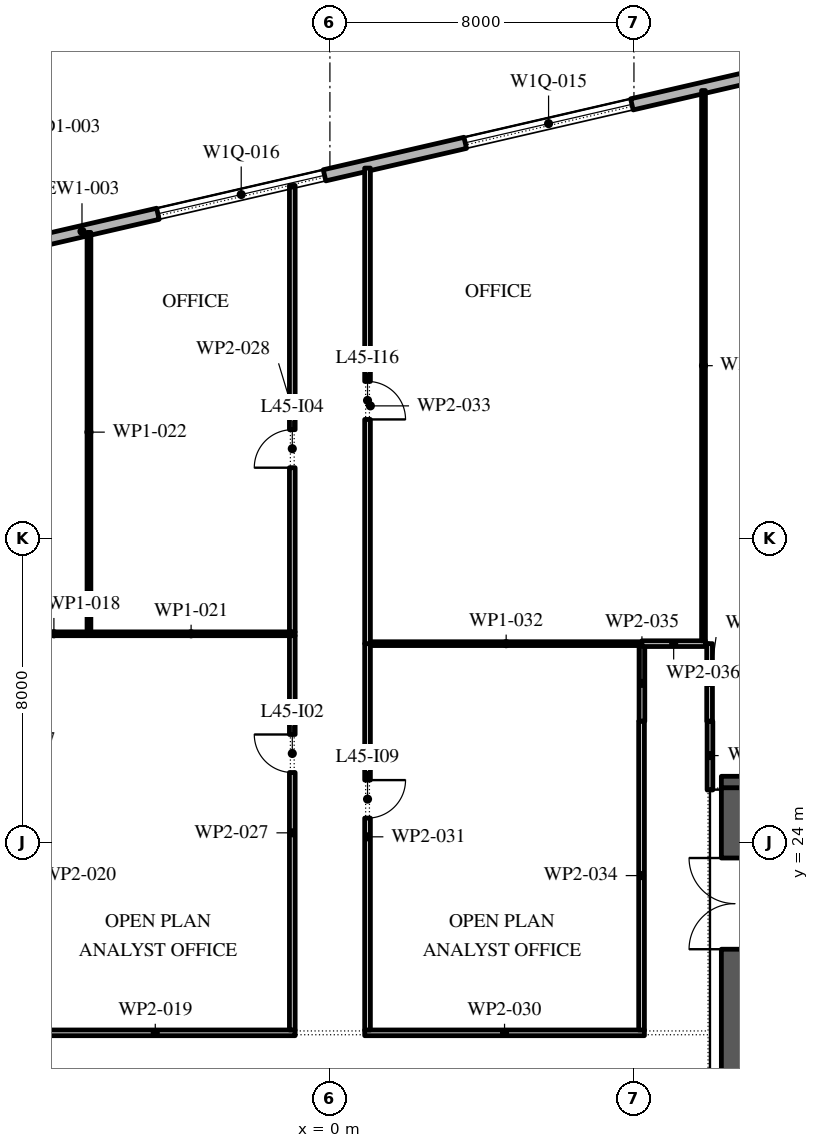
"""IFC4 building model, lengths in metres.
Left out: names, types, materials, properties, quantities, classifications, styles, units other than length and angle.
Written with IfcOpenShell. Run it as: python <this file> out.ifc"""

import sys

from ifc_helpers import new_model, si_unit, direction, frame, frame_2d, origin, place, context, subcontext, project, spatial, rectangle, extrude, element, fill, save


model = new_model("IFC4")
c1 = context("Model", 3, precision=1e-05, world=origin(), true_north=direction((0.0, 1.0)))
c2 = subcontext(c1, "Body", "Model", "MODEL_VIEW")
j1 = project(units=[si_unit("LENGTHUNIT", "METRE"), si_unit("PLANEANGLEUNIT", "RADIAN")], contexts=[c1])
p1 = place(None, origin())
s1 = spatial("IfcSite", under=j1, at=p1, CompositionType="ELEMENT")
p2 = place(p1, origin())
s2 = spatial("IfcBuilding", under=s1, at=p2, CompositionType="ELEMENT")
p3 = place(p2, frame((0.0, 0.0, 205.2)))
s3 = spatial("IfcBuildingStorey", under=s2, at=p3, CompositionType="ELEMENT", Elevation=205.2)
p4 = place(p3, frame((17.592, 45.657, 0.0), z_axis=(0.0, 0.0, 1.0), x_axis=(-0.974370243697, -0.224950279389, 0.0)))
e1 = element("IfcWall", 1, at=p4, inside=s3, PredefinedType="STANDARD", context=c2, shape_type="SweptSolid", body=[
    extrude(rectangle(XDim=49.5, YDim=0.3, at=frame_2d((24.75, 0.0))), origin(), (0.0, 0.0, 1.0), 4.0),
])
p5 = place(p4, frame((2.8, 0.0, 0.0)))
e2 = element("IfcOpeningElement", 2, at=p5, cuts=e1, PredefinedType="OPENING", context=c2, shape_type="SweptSolid", body=[
    extrude(rectangle(XDim=2.4, YDim=3.5, at=frame_2d((1.2, 1.75))), frame((0.0, 0.16, 0.0), z_axis=(0.0, -1.0, 0.0), x_axis=(1.0, 0.0, 0.0)), (0.0, 0.0, 1.0), 0.32),
])
p6 = place(p4, frame((9.9, 0.0, 0.45)))
e3 = element("IfcOpeningElement", 3, at=p6, cuts=e1, PredefinedType="OPENING", context=c2, shape_type="SweptSolid", body=[
    extrude(rectangle(XDim=4.5, YDim=2.45, at=frame_2d((2.25, 1.225))), frame((0.0, 0.16, 0.0), z_axis=(0.0, -1.0, 0.0), x_axis=(1.0, 0.0, 0.0)), (0.0, 0.0, 1.0), 0.32),
])
p7 = place(p4, frame((18.2, 0.0, 0.45)))
e4 = element("IfcOpeningElement", 4, at=p7, cuts=e1, PredefinedType="OPENING", context=c2, shape_type="SweptSolid", body=[
    extrude(rectangle(XDim=4.5, YDim=2.45, at=frame_2d((2.25, 1.225))), frame((0.0, 0.16, 0.0), z_axis=(0.0, -1.0, 0.0), x_axis=(1.0, 0.0, 0.0)), (0.0, 0.0, 1.0), 0.32),
])
p8 = place(p4, frame((26.5, 0.0, 0.45)))
e5 = element("IfcOpeningElement", 5, at=p8, cuts=e1, PredefinedType="OPENING", context=c2, shape_type="SweptSolid", body=[
    extrude(rectangle(XDim=4.5, YDim=2.45, at=frame_2d((2.25, 1.225))), frame((0.0, 0.16, 0.0), z_axis=(0.0, -1.0, 0.0), x_axis=(1.0, 0.0, 0.0)), (0.0, 0.0, 1.0), 0.32),
])
p9 = place(p4, frame((35.85, 0.0, 0.0)))
e6 = element("IfcOpeningElement", 6, at=p9, cuts=e1, PredefinedType="OPENING", context=c2, shape_type="SweptSolid", body=[
    extrude(rectangle(XDim=2.4, YDim=3.5, at=frame_2d((1.2, 1.75))), frame((0.0, 0.16, 0.0), z_axis=(0.0, -1.0, 0.0), x_axis=(1.0, 0.0, 0.0)), (0.0, 0.0, 1.0), 0.32),
])
p10 = place(p4, frame((43.1, 0.0, 0.45)))
e7 = element("IfcOpeningElement", 7, at=p10, cuts=e1, PredefinedType="OPENING", context=c2, shape_type="SweptSolid", body=[
    extrude(rectangle(XDim=4.5, YDim=2.575, at=frame_2d((2.25, 1.288))), frame((0.0, 0.16, 0.0), z_axis=(0.0, -1.0, 0.0), x_axis=(1.0, 0.0, 0.0)), (0.0, 0.0, 1.0), 0.32),
])
p11 = place(p3, frame((10.65, -2.45, 0.0), z_axis=(0.0, 0.0, 1.0), x_axis=(0.0, 1.0, 0.0)))
e8 = element("IfcWall", 8, at=p11, inside=s3, PredefinedType="SHEAR", context=c2, shape_type="SweptSolid", body=[
    extrude(rectangle(XDim=27.9, YDim=0.7, at=frame_2d((13.95, 0.0))), origin(), (0.0, 0.0, 1.0), 4.0),
])
p12 = place(p11, frame((23.65, 0.0, 0.0)))
e9 = element("IfcOpeningElement", 9, at=p12, cuts=e8, PredefinedType="OPENING", context=c2, shape_type="SweptSolid", body=[
    extrude(rectangle(XDim=2.4, YDim=2.1, at=frame_2d((1.2, 1.05))), frame((0.0, 0.36, 0.0), z_axis=(0.0, -1.0, 0.0), x_axis=(1.0, 0.0, 0.0)), (0.0, 0.0, 1.0), 0.72),
])
p13 = place(p11, frame((1.087, 0.0, 0.0)))
e10 = element("IfcOpeningElement", 10, at=p13, cuts=e8, PredefinedType="OPENING", context=c2, shape_type="SweptSolid", body=[
    extrude(rectangle(XDim=0.9, YDim=2.1, at=frame_2d((0.45, 1.05))), frame((0.0, 0.36, 0.0), z_axis=(0.0, -1.0, 0.0), x_axis=(1.0, 0.0, 0.0)), (0.0, 0.0, 1.0), 0.72),
])
p14 = place(p11, frame((4.262, 0.0, 0.0)))
e11 = element("IfcOpeningElement", 11, at=p14, cuts=e8, PredefinedType="OPENING", context=c2, shape_type="SweptSolid", body=[
    extrude(rectangle(XDim=1.0, YDim=2.1, at=frame_2d((0.5, 1.05))), frame((0.0, 0.36, 0.0), z_axis=(0.0, -1.0, 0.0), x_axis=(1.0, 0.0, 0.0)), (0.0, 0.0, 1.0), 0.72),
])
p15 = place(p3, frame((10.3, 25.6, 0.0), z_axis=(0.0, 0.0, 1.0), x_axis=(1.0, 0.0, 0.0)))
e12 = element("IfcWall", 12, at=p15, inside=s3, PredefinedType="SHEAR", context=c2, shape_type="SweptSolid", body=[
    extrude(rectangle(XDim=11.4, YDim=0.3, at=frame_2d((5.7, 0.0))), origin(), (0.0, 0.0, 1.0), 4.0),
])
p16 = place(p3, frame((-8.135, 29.5, 0.0), z_axis=(0.0, 0.0, 1.0), x_axis=(1.0, 0.0, 0.0)))
e13 = element("IfcWall", 13, at=p16, inside=s3, PredefinedType="PARTITIONING", context=c2, shape_type="SweptSolid", body=[
    extrude(rectangle(XDim=1.745, YDim=0.1, at=frame_2d((0.873, 0.0))), origin(), (0.0, 0.0, 1.0), 4.0),
])
p17 = place(p3, frame((-8.275, 19.0, 0.0), z_axis=(0.0, 0.0, 1.0), x_axis=(1.0, 0.0, 0.0)))
e14 = element("IfcWall", 14, at=p17, inside=s3, PredefinedType="PARTITIONING", context=c2, shape_type="SweptSolid", body=[
    extrude(rectangle(XDim=7.36, YDim=0.15, at=frame_2d((3.68, 0.0))), origin(), (0.0, 0.0, 1.0), 4.0),
])
p18 = place(p3, frame((-6.39, 29.5, 0.0), z_axis=(0.0, 0.0, 1.0), x_axis=(1.0, 0.0, 0.0)))
e15 = element("IfcWall", 15, at=p18, inside=s3, PredefinedType="PARTITIONING", context=c2, shape_type="SweptSolid", body=[
    extrude(rectangle(XDim=5.475, YDim=0.1, at=frame_2d((2.737, 0.0))), origin(), (0.0, 0.0, 1.0), 4.0),
])
p19 = place(p3, frame((-6.34, 40.061, 0.0), z_axis=(0.0, 0.0, 1.0), x_axis=(0.0, -1.0, 0.0)))
e16 = element("IfcWall", 16, at=p19, inside=s3, PredefinedType="PARTITIONING", context=c2, shape_type="SweptSolid", body=[
    extrude(rectangle(XDim=10.511, YDim=0.1, at=frame_2d((5.255, 0.0))), origin(), (0.0, 0.0, 1.0), 4.0),
])
p20 = place(p3, frame((-0.99, 19.075, 0.0), z_axis=(0.0, 0.0, 1.0), x_axis=(0.0, 1.0, 0.0)))
e17 = element("IfcWall", 17, at=p20, inside=s3, PredefinedType="PARTITIONING", context=c2, shape_type="SweptSolid", body=[
    extrude(rectangle(XDim=10.375, YDim=0.15, at=frame_2d((5.188, 0.0))), origin(), (0.0, 0.0, 1.0), 4.0),
])
p21 = place(p20, frame((6.775, 0.0, 0.0)))
e18 = element("IfcOpeningElement", 18, at=p21, cuts=e17, PredefinedType="OPENING", context=c2, shape_type="SweptSolid", body=[
    extrude(rectangle(XDim=1.0, YDim=2.1, at=frame_2d((0.5, 1.05))), frame((0.0, 0.085, 0.0), z_axis=(0.0, -1.0, 0.0), x_axis=(1.0, 0.0, 0.0)), (0.0, 0.0, 1.0), 0.17),
])
p22 = place(p3, frame((-0.99, 29.55, 0.0), z_axis=(0.0, 0.0, 1.0), x_axis=(0.0, 1.0, 0.0)))
e19 = element("IfcWall", 19, at=p22, inside=s3, PredefinedType="PARTITIONING", context=c2, shape_type="SweptSolid", body=[
    extrude(rectangle(XDim=11.746, YDim=0.15, at=frame_2d((5.873, 0.0))), origin(), (0.0, 0.0, 1.0), 4.0),
])
p23 = place(p22, frame((4.32, 0.0, 0.0)))
e20 = element("IfcOpeningElement", 20, at=p23, cuts=e19, PredefinedType="OPENING", context=c2, shape_type="SweptSolid", body=[
    extrude(rectangle(XDim=1.0, YDim=2.1, at=frame_2d((0.5, 1.05))), frame((0.0, 0.085, 0.0), z_axis=(0.0, -1.0, 0.0), x_axis=(1.0, 0.0, 0.0)), (0.0, 0.0, 1.0), 0.17),
])
p24 = place(p3, frame((0.915, 19.0, 0.0), z_axis=(0.0, 0.0, 1.0), x_axis=(1.0, 0.0, 0.0)))
e21 = element("IfcWall", 21, at=p24, inside=s3, PredefinedType="PARTITIONING", context=c2, shape_type="SweptSolid", body=[
    extrude(rectangle(XDim=7.36, YDim=0.15, at=frame_2d((3.68, 0.0))), origin(), (0.0, 0.0, 1.0), 4.0),
])
p25 = place(p3, frame((0.99, 29.24, 0.0), z_axis=(0.0, 0.0, 1.0), x_axis=(0.0, -1.0, 0.0)))
e22 = element("IfcWall", 22, at=p25, inside=s3, PredefinedType="PARTITIONING", context=c2, shape_type="SweptSolid", body=[
    extrude(rectangle(XDim=10.165, YDim=0.15, at=frame_2d((5.083, 0.0))), origin(), (0.0, 0.0, 1.0), 4.0),
])
p26 = place(p25, frame((3.59, 0.0, 0.0)))
e23 = element("IfcOpeningElement", 23, at=p26, cuts=e22, PredefinedType="OPENING", context=c2, shape_type="SweptSolid", body=[
    extrude(rectangle(XDim=1.0, YDim=2.1, at=frame_2d((0.5, 1.05))), frame((0.0, 0.085, 0.0), z_axis=(0.0, -1.0, 0.0), x_axis=(1.0, 0.0, 0.0)), (0.0, 0.0, 1.0), 0.17),
])
p27 = place(p3, frame((1.065, 29.24, 0.0), z_axis=(0.0, 0.0, 1.0), x_axis=(1.0, 0.0, 0.0)))
e24 = element("IfcWall", 24, at=p27, inside=s3, PredefinedType="PARTITIONING", context=c2, shape_type="SweptSolid", body=[
    extrude(rectangle(XDim=7.145, YDim=0.1, at=frame_2d((3.573, 0.0))), origin(), (0.0, 0.0, 1.0), 4.0),
])
p28 = place(p3, frame((0.99, 41.753, 0.0), z_axis=(0.0, 0.0, 1.0), x_axis=(0.0, -1.0, 0.0)))
e25 = element("IfcWall", 25, at=p28, inside=s3, PredefinedType="PARTITIONING", context=c2, shape_type="SweptSolid", body=[
    extrude(rectangle(XDim=12.513, YDim=0.15, at=frame_2d((6.256, 0.0))), origin(), (0.0, 0.0, 1.0), 4.0),
])
p29 = place(p28, frame((5.613, 0.0, 0.0)))
e26 = element("IfcOpeningElement", 26, at=p29, cuts=e25, PredefinedType="OPENING", context=c2, shape_type="SweptSolid", body=[
    extrude(rectangle(XDim=1.0, YDim=2.1, at=frame_2d((0.5, 1.05))), frame((0.0, 0.085, 0.0), z_axis=(0.0, -1.0, 0.0), x_axis=(1.0, 0.0, 0.0)), (0.0, 0.0, 1.0), 0.17),
])
p30 = place(p3, frame((8.2, 19.075, 0.0), z_axis=(0.0, 0.0, 1.0), x_axis=(0.0, 1.0, 0.0)))
e27 = element("IfcWall", 27, at=p30, inside=s3, PredefinedType="PARTITIONING", context=c2, shape_type="SweptSolid", body=[
    extrude(rectangle(XDim=8.125, YDim=0.15, at=frame_2d((4.062, 0.0))), origin(), (0.0, 0.0, 1.0), 4.0),
])
p31 = place(p3, frame((8.21, 27.2, 0.0), z_axis=(0.0, 0.0, 1.0), x_axis=(0.0, 1.0, 0.0)))
e28 = element("IfcWall", 28, at=p31, inside=s3, PredefinedType="PARTITIONING", context=c2, shape_type="SweptSolid", body=[
    extrude(rectangle(XDim=1.99, YDim=0.15, at=frame_2d((0.995, 0.0))), origin(), (0.0, 0.0, 1.0), 4.0),
])
p32 = place(p3, frame((8.21, 29.24, 0.0), z_axis=(0.0, 0.0, 1.0), x_axis=(1.0, 0.0, 0.0)))
e29 = element("IfcWall", 29, at=p32, inside=s3, PredefinedType="PARTITIONING", context=c2, shape_type="SweptSolid", body=[
    extrude(rectangle(XDim=1.67, YDim=0.15, at=frame_2d((0.835, 0.0))), origin(), (0.0, 0.0, 1.0), 4.0),
])
p33 = place(p3, frame((9.83, 43.794, 0.0), z_axis=(0.0, 0.0, 1.0), x_axis=(0.0, -1.0, 0.0)))
e30 = element("IfcWall", 30, at=p33, inside=s3, PredefinedType="PARTITIONING", context=c2, shape_type="SweptSolid", body=[
    extrude(rectangle(XDim=14.479, YDim=0.1, at=frame_2d((7.24, 0.0))), origin(), (0.0, 0.0, 1.0), 3.02),
])
p34 = place(p3, frame((9.99, 29.24, 0.0), z_axis=(0.0, 0.0, 1.0), x_axis=(0.0, -1.0, 0.0)))
e31 = element("IfcWall", 31, at=p34, inside=s3, PredefinedType="PARTITIONING", context=c2, shape_type="SweptSolid", body=[
    extrude(rectangle(XDim=2.04, YDim=0.15, at=frame_2d((1.02, 0.0))), origin(), (0.0, 0.0, 1.0), 3.02),
])
p35 = place(p3, frame((10.0, 27.2, 0.0), z_axis=(0.0, 0.0, 1.0), x_axis=(0.0, -1.0, 0.0)))
e32 = element("IfcWall", 32, at=p35, inside=s3, PredefinedType="PARTITIONING", context=c2, shape_type="SweptSolid", body=[
    extrude(rectangle(XDim=1.81, YDim=0.15, at=frame_2d((0.905, 0.0))), origin(), (0.0, 0.0, 1.0), 3.02),
])
p36 = place(p6, origin())
e33 = element("IfcWindow", 33, at=p36, inside=s3, PartitioningType="DOUBLE_PANEL_VERTICAL", PredefinedType="WINDOW", context=c2, shape_type="SweptSolid", body=[
    extrude(rectangle(XDim=4.5, YDim=2.45, at=frame_2d((2.25, 1.225))), frame((0.0, 0.03, 0.0), z_axis=(0.0, -1.0, 0.0), x_axis=(1.0, 0.0, 0.0)), (0.0, 0.0, 1.0), 0.06),
])
fill(e3, e33)
p37 = place(p7, origin())
e34 = element("IfcWindow", 34, at=p37, inside=s3, PartitioningType="DOUBLE_PANEL_VERTICAL", PredefinedType="WINDOW", context=c2, shape_type="SweptSolid", body=[
    extrude(rectangle(XDim=4.5, YDim=2.45, at=frame_2d((2.25, 1.225))), frame((0.0, 0.03, 0.0), z_axis=(0.0, -1.0, 0.0), x_axis=(1.0, 0.0, 0.0)), (0.0, 0.0, 1.0), 0.06),
])
fill(e4, e34)
p38 = place(p12, origin())
e35 = element("IfcDoor", 35, at=p38, inside=s3, OperationType="DOUBLE_DOOR_SINGLE_SWING", PredefinedType="DOOR", context=c2, shape_type="SweptSolid", body=[
    extrude(rectangle(XDim=2.4, YDim=2.1, at=frame_2d((1.2, 1.05))), frame((0.0, 0.025, 0.0), z_axis=(0.0, -1.0, 0.0), x_axis=(1.0, 0.0, 0.0)), (0.0, 0.0, 1.0), 0.05),
])
fill(e9, e35)
p39 = place(p21, origin())
e36 = element("IfcDoor", 36, at=p39, inside=s3, OperationType="SINGLE_SWING_LEFT", PredefinedType="DOOR", context=c2, shape_type="SweptSolid", body=[
    extrude(rectangle(XDim=1.0, YDim=2.1, at=frame_2d((0.5, 1.05))), frame((0.0, 0.025, 0.0), z_axis=(0.0, -1.0, 0.0), x_axis=(1.0, 0.0, 0.0)), (0.0, 0.0, 1.0), 0.05),
])
fill(e18, e36)
p40 = place(p23, origin())
e37 = element("IfcDoor", 37, at=p40, inside=s3, OperationType="SINGLE_SWING_RIGHT", PredefinedType="DOOR", context=c2, shape_type="SweptSolid", body=[
    extrude(rectangle(XDim=1.0, YDim=2.1, at=frame_2d((0.5, 1.05))), frame((0.0, 0.025, 0.0), z_axis=(0.0, -1.0, 0.0), x_axis=(1.0, 0.0, 0.0)), (0.0, 0.0, 1.0), 0.05),
])
fill(e20, e37)
p41 = place(p26, origin())
e38 = element("IfcDoor", 38, at=p41, inside=s3, OperationType="SINGLE_SWING_RIGHT", PredefinedType="DOOR", context=c2, shape_type="SweptSolid", body=[
    extrude(rectangle(XDim=1.0, YDim=2.1, at=frame_2d((0.5, 1.05))), frame((0.0, 0.025, 0.0), z_axis=(0.0, -1.0, 0.0), x_axis=(1.0, 0.0, 0.0)), (0.0, 0.0, 1.0), 0.05),
])
fill(e23, e38)
p42 = place(p29, origin())
e39 = element("IfcDoor", 39, at=p42, inside=s3, OperationType="SINGLE_SWING_LEFT", PredefinedType="DOOR", context=c2, shape_type="SweptSolid", body=[
    extrude(rectangle(XDim=1.0, YDim=2.1, at=frame_2d((0.5, 1.05))), frame((0.0, 0.025, 0.0), z_axis=(0.0, -1.0, 0.0), x_axis=(1.0, 0.0, 0.0)), (0.0, 0.0, 1.0), 0.05),
])
fill(e26, e39)
save(model, sys.argv[1])
